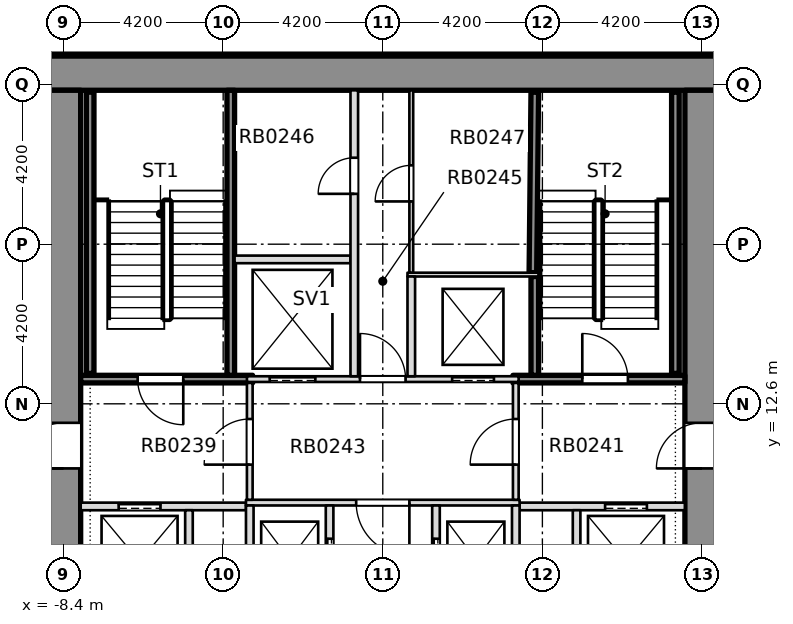
"""IFC4 building model, lengths in metres.
Left out: names, types, materials, properties, quantities, classifications, styles, units other than length and angle.
Written with IfcOpenShell. Run it as: python <this file> out.ifc"""

import sys

from ifc_helpers import new_model, si_unit, direction, frame, frame_2d, origin, place, context, subcontext, project, spatial, polyline, rectangle, outline, extrude, element, fill, save


model = new_model("IFC4")
c1 = context("Model", 3, precision=1e-05, world=origin(), true_north=direction((0.0, 1.0)))
c2 = subcontext(c1, "Body", "Model", "MODEL_VIEW")
j1 = project(units=[si_unit("LENGTHUNIT", "METRE"), si_unit("PLANEANGLEUNIT", "RADIAN")], contexts=[c1])
p1 = place(None, origin())
s1 = spatial("IfcSite", under=j1, at=p1, CompositionType="ELEMENT")
p2 = place(p1, origin())
s2 = spatial("IfcBuilding", under=s1, at=p2, CompositionType="ELEMENT")
p3 = place(p2, frame((0.0, 0.0, -8.4)))
s3 = spatial("IfcBuildingStorey", under=s2, at=p3, CompositionType="ELEMENT", Elevation=-8.4)
p4 = place(p3, frame((-11.7, 21.3, 0.0), z_axis=(0.0, 0.0, 1.0), x_axis=(1.0, 0.0, 0.0)))
e1 = element("IfcWall", 1, at=p4, inside=s3, PredefinedType="SOLIDWALL", context=c2, shape_type="SweptSolid", body=[
    extrude(rectangle(XDim=23.4, YDim=0.9, at=frame_2d((11.7, 0.0))), origin(), (0.0, 0.0, 1.0), 3.85),
])
p5 = place(p3, frame((-8.4, -7.5, 0.0), z_axis=(0.0, 0.0, 1.0), x_axis=(0.0, 1.0, 0.0)))
e2 = element("IfcWall", 2, at=p5, inside=s3, PredefinedType="SHEAR", context=c2, shape_type="SweptSolid", body=[
    extrude(rectangle(XDim=28.35, YDim=0.9, at=frame_2d((14.175, 0.0))), origin(), (0.0, 0.0, 1.0), 3.85),
])
p6 = place(p5, frame((18.4, 0.0, 0.0)))
e3 = element("IfcOpeningElement", 3, at=p6, cuts=e2, PredefinedType="OPENING", context=c2, shape_type="SweptSolid", body=[
    extrude(rectangle(XDim=1.2, YDim=2.1, at=frame_2d((0.6, 1.05))), frame((0.0, 0.46, 0.0), z_axis=(0.0, -1.0, 0.0), x_axis=(1.0, 0.0, 0.0)), (0.0, 0.0, 1.0), 0.92),
])
p7 = place(p3, frame((8.4, -7.5, 0.0), z_axis=(0.0, 0.0, 1.0), x_axis=(0.0, 1.0, 0.0)))
e4 = element("IfcWall", 4, at=p7, inside=s3, PredefinedType="SHEAR", context=c2, shape_type="SweptSolid", body=[
    extrude(rectangle(XDim=28.35, YDim=0.9, at=frame_2d((14.175, 0.0))), origin(), (0.0, 0.0, 1.0), 3.85),
])
p8 = place(p7, frame((18.4, 0.0, 0.0)))
e5 = element("IfcOpeningElement", 5, at=p8, cuts=e4, PredefinedType="OPENING", context=c2, shape_type="SweptSolid", body=[
    extrude(rectangle(XDim=1.2, YDim=2.1, at=frame_2d((0.6, 1.05))), frame((0.0, 0.46, 0.0), z_axis=(0.0, -1.0, 0.0), x_axis=(1.0, 0.0, 0.0)), (0.0, 0.0, 1.0), 0.92),
])
p9 = place(p3, frame((-17.6, 22.0, 0.0), z_axis=(0.0, 0.0, 1.0), x_axis=(1.0, 0.0, 0.0)))
e6 = element("IfcWall", 6, at=p9, inside=s3, PredefinedType="SOLIDWALL", context=c2, shape_type="SweptSolid", body=[
    extrude(outline(polyline([(0.0, 0.0), (35.2, 0.0), (35.2, 3.9), (34.6, 3.899), (32.2, 3.702), (3.0, -0.105), (0.0, -0.301), (0.0, 0.0)])), frame((0.0, 0.2, 0.0), z_axis=(0.0, -1.0, 0.0), x_axis=(1.0, 0.0, 0.0)), (0.0, 0.0, 1.0), 0.4),
])
p10 = place(p3, frame((-7.949, 9.9, 0.0), z_axis=(0.0, 0.0, 1.0), x_axis=(1.0, 0.0, 0.0)))
e7 = element("IfcWall", 7, at=p10, inside=s3, PredefinedType="PARTITIONING", context=c2, shape_type="SweptSolid", body=[
    extrude(rectangle(XDim=4.349, YDim=0.2, at=frame_2d((2.174, 0.0))), origin(), (0.0, 0.0, 1.0), 3.85),
])
p11 = place(p10, frame((0.999, 0.0, 0.0)))
e8 = element("IfcOpeningElement", 8, at=p11, cuts=e7, PredefinedType="OPENING", context=c2, shape_type="SweptSolid", body=[
    extrude(rectangle(XDim=1.1, YDim=2.1, at=frame_2d((0.55, 1.05))), frame((0.0, 0.11, 0.0), z_axis=(0.0, -1.0, 0.0), x_axis=(1.0, 0.0, 0.0)), (0.0, 0.0, 1.0), 0.22),
])
p12 = place(p3, frame((3.6, 9.9, 0.0), z_axis=(0.0, 0.0, 1.0), x_axis=(1.0, 0.0, 0.0)))
e9 = element("IfcWall", 9, at=p12, inside=s3, PredefinedType="PARTITIONING", context=c2, shape_type="SweptSolid", body=[
    extrude(rectangle(XDim=4.349, YDim=0.2, at=frame_2d((2.174, 0.0))), origin(), (0.0, 0.0, 1.0), 3.85),
])
p13 = place(p12, frame((2.25, 0.0, 0.0)))
e10 = element("IfcOpeningElement", 10, at=p13, cuts=e9, PredefinedType="OPENING", context=c2, shape_type="SweptSolid", body=[
    extrude(rectangle(XDim=1.1, YDim=2.1, at=frame_2d((0.55, 1.05))), frame((0.0, 0.11, 0.0), z_axis=(0.0, -1.0, 0.0), x_axis=(1.0, 0.0, 0.0)), (0.0, 0.0, 1.0), 0.22),
])
p14 = place(p3, frame((-3.6, 10.0, 0.0), z_axis=(0.0, 0.0, 1.0), x_axis=(1.0, 0.0, 0.0)))
e11 = element("IfcWall", 11, at=p14, inside=s3, PredefinedType="PARTITIONING", context=c2, shape_type="SweptSolid", body=[
    extrude(rectangle(XDim=7.2, YDim=0.15, at=frame_2d((3.6, 0.0))), origin(), (0.0, 0.0, 1.0), 3.85),
])
p15 = place(p14, frame((2.9, 0.0, 0.0)))
e12 = element("IfcOpeningElement", 12, at=p15, cuts=e11, PredefinedType="OPENING", context=c2, shape_type="SweptSolid", body=[
    extrude(rectangle(XDim=1.4, YDim=2.1, at=frame_2d((0.7, 1.05))), frame((0.0, 0.085, 0.0), z_axis=(0.0, -1.0, 0.0), x_axis=(1.0, 0.0, 0.0)), (0.0, 0.0, 1.0), 0.17),
])
p16 = place(p3, frame((-7.949, 13.25, 0.0), z_axis=(0.0, 0.0, 1.0), x_axis=(1.0, 0.0, 0.0)))
e13 = element("IfcWall", 13, at=p16, inside=s3, PredefinedType="SOLIDWALL", context=c2, shape_type="SweptSolid", body=[
    extrude(rectangle(XDim=4.524, YDim=0.2, at=frame_2d((2.262, 0.0))), origin(), (0.0, 0.0, 1.0), 3.85),
])
p17 = place(p16, frame((1.499, 0.0, 0.0)))
e14 = element("IfcOpeningElement", 14, at=p17, cuts=e13, PredefinedType="OPENING", context=c2, shape_type="SweptSolid", body=[
    extrude(rectangle(XDim=1.2, YDim=2.1, at=frame_2d((0.6, 1.05))), frame((0.0, 0.11, 0.0), z_axis=(0.0, -1.0, 0.0), x_axis=(1.0, 0.0, 0.0)), (0.0, 0.0, 1.0), 0.22),
])
p18 = place(p3, frame((-3.575, 13.25, 0.0), z_axis=(0.0, 0.0, 1.0), x_axis=(1.0, 0.0, 0.0)))
e15 = element("IfcWall", 15, at=p18, inside=s3, PredefinedType="PARTITIONING", context=c2, shape_type="SweptSolid", body=[
    extrude(rectangle(XDim=7.15, YDim=0.15, at=frame_2d((3.575, 0.0))), origin(), (0.0, 0.0, 1.0), 3.85),
])
p19 = place(p18, frame((0.6, 0.0, 0.0)))
e16 = element("IfcOpeningElement", 16, at=p19, cuts=e15, PredefinedType="OPENING", context=c2, shape_type="SweptSolid", body=[
    extrude(rectangle(XDim=1.2, YDim=2.1, at=frame_2d((0.6, 1.05))), frame((0.0, 0.085, 0.0), z_axis=(0.0, -1.0, 0.0), x_axis=(1.0, 0.0, 0.0)), (0.0, 0.0, 1.0), 0.17),
])
p20 = place(p18, frame((5.4, 0.0, 0.0)))
e17 = element("IfcOpeningElement", 17, at=p20, cuts=e15, PredefinedType="OPENING", context=c2, shape_type="SweptSolid", body=[
    extrude(rectangle(XDim=1.1, YDim=2.1, at=frame_2d((0.55, 1.05))), frame((0.0, 0.085, 0.0), z_axis=(0.0, -1.0, 0.0), x_axis=(1.0, 0.0, 0.0)), (0.0, 0.0, 1.0), 0.17),
])
p21 = place(p18, frame((2.975, 0.0, 0.0)))
e18 = element("IfcOpeningElement", 18, at=p21, cuts=e15, PredefinedType="OPENING", context=c2, shape_type="SweptSolid", body=[
    extrude(rectangle(XDim=1.2, YDim=2.1, at=frame_2d((0.6, 1.05))), frame((0.0, 0.085, 0.0), z_axis=(0.0, -1.0, 0.0), x_axis=(1.0, 0.0, 0.0)), (0.0, 0.0, 1.0), 0.17),
])
p22 = place(p3, frame((3.425, 13.25, 0.0), z_axis=(0.0, 0.0, 1.0), x_axis=(1.0, 0.0, 0.0)))
e19 = element("IfcWall", 19, at=p22, inside=s3, PredefinedType="SOLIDWALL", context=c2, shape_type="SweptSolid", body=[
    extrude(rectangle(XDim=4.524, YDim=0.2, at=frame_2d((2.262, 0.0))), origin(), (0.0, 0.0, 1.0), 3.85),
])
p23 = place(p22, frame((1.825, 0.0, 0.0)))
e20 = element("IfcOpeningElement", 20, at=p23, cuts=e19, PredefinedType="OPENING", context=c2, shape_type="SweptSolid", body=[
    extrude(rectangle(XDim=1.2, YDim=2.1, at=frame_2d((0.6, 1.05))), frame((0.0, 0.11, 0.0), z_axis=(0.0, -1.0, 0.0), x_axis=(1.0, 0.0, 0.0)), (0.0, 0.0, 1.0), 0.22),
])
p24 = place(p3, frame((0.65, 16.0, 0.0), z_axis=(0.0, 0.0, 1.0), x_axis=(1.0, 0.0, 0.0)))
e21 = element("IfcWall", 21, at=p24, inside=s3, PredefinedType="PARTITIONING", context=c2, shape_type="SweptSolid", body=[
    extrude(rectangle(XDim=3.45, YDim=0.1, at=frame_2d((1.725, 0.0))), origin(), (0.0, 0.0, 1.0), 3.85),
])
p25 = place(p3, frame((-3.9, 16.4, 0.0), z_axis=(0.0, 0.0, 1.0), x_axis=(1.0, 0.0, 0.0)))
e22 = element("IfcWall", 22, at=p25, inside=s3, PredefinedType="PARTITIONING", context=c2, shape_type="SweptSolid", body=[
    extrude(rectangle(XDim=3.05, YDim=0.2, at=frame_2d((1.525, 0.0))), origin(), (0.0, 0.0, 1.0), 3.85),
])
p26 = place(p3, frame((-5.1, 7.075, 0.0), z_axis=(0.0, 0.0, 1.0), x_axis=(0.0, 1.0, 0.0)))
e23 = element("IfcWall", 23, at=p26, inside=s3, PredefinedType="PARTITIONING", context=c2, shape_type="SweptSolid", body=[
    extrude(rectangle(XDim=2.725, YDim=0.2, at=frame_2d((1.363, 0.0))), origin(), (0.0, 0.0, 1.0), 3.85),
])
p27 = place(p3, frame((-4.0, 13.35, 0.0), z_axis=(0.0, 0.0, 1.0), x_axis=(0.0, 1.0, 0.0)))
e24 = element("IfcWall", 24, at=p27, inside=s3, PredefinedType="SOLIDWALL", context=c2, shape_type="SweptSolid", body=[
    extrude(rectangle(XDim=7.499, YDim=0.2, at=frame_2d((3.75, 0.0))), origin(), (0.0, 0.0, 1.0), 3.85),
])
p28 = place(p3, frame((-3.5, 7.075, 0.0), z_axis=(0.0, 0.0, 1.0), x_axis=(0.0, 1.0, 0.0)))
e25 = element("IfcWall", 25, at=p28, inside=s3, PredefinedType="PARTITIONING", context=c2, shape_type="SweptSolid", body=[
    extrude(rectangle(XDim=2.85, YDim=0.2, at=frame_2d((1.425, 0.0))), origin(), (0.0, 0.0, 1.0), 3.85),
])
p29 = place(p3, frame((-3.5, 10.075, 0.0), z_axis=(0.0, 0.0, 1.0), x_axis=(0.0, 1.0, 0.0)))
e26 = element("IfcWall", 26, at=p29, inside=s3, PredefinedType="PARTITIONING", context=c2, shape_type="SweptSolid", body=[
    extrude(rectangle(XDim=3.075, YDim=0.15, at=frame_2d((1.538, 0.0))), origin(), (0.0, 0.0, 1.0), 3.85),
])
p30 = place(p29, frame((0.925, 0.0, 0.0)))
e27 = element("IfcOpeningElement", 27, at=p30, cuts=e26, PredefinedType="OPENING", context=c2, shape_type="SweptSolid", body=[
    extrude(rectangle(XDim=1.2, YDim=2.1, at=frame_2d((0.6, 1.05))), frame((0.0, 0.085, 0.0), z_axis=(0.0, -1.0, 0.0), x_axis=(1.0, 0.0, 0.0)), (0.0, 0.0, 1.0), 0.17),
])
p31 = place(p3, frame((-1.4, 7.075, 0.0), z_axis=(0.0, 0.0, 1.0), x_axis=(0.0, 1.0, 0.0)))
e28 = element("IfcWall", 28, at=p31, inside=s3, PredefinedType="PARTITIONING", context=c2, shape_type="SweptSolid", body=[
    extrude(rectangle(XDim=2.85, YDim=0.2, at=frame_2d((1.425, 0.0))), origin(), (0.0, 0.0, 1.0), 3.85),
])
p32 = place(p31, frame((0.875, 0.0, 0.0)))
e29 = element("IfcOpeningElement", 29, at=p32, cuts=e28, PredefinedType="OPENING", context=c2, shape_type="SweptSolid", body=[
    extrude(rectangle(XDim=1.1, YDim=2.1, at=frame_2d((0.55, 1.05))), frame((0.0, 0.11, 0.0), z_axis=(0.0, -1.0, 0.0), x_axis=(1.0, 0.0, 0.0)), (0.0, 0.0, 1.0), 0.22),
])
p33 = place(p3, frame((-0.75, 13.325, 0.0), z_axis=(0.0, 0.0, 1.0), x_axis=(0.0, 1.0, 0.0)))
e30 = element("IfcWall", 30, at=p33, inside=s3, PredefinedType="PARTITIONING", context=c2, shape_type="SweptSolid", body=[
    extrude(rectangle(XDim=7.524, YDim=0.2, at=frame_2d((3.762, 0.0))), origin(), (0.0, 0.0, 1.0), 3.85),
])
p34 = place(p33, frame((4.8, 0.0, 0.0)))
e31 = element("IfcOpeningElement", 31, at=p34, cuts=e30, PredefinedType="OPENING", context=c2, shape_type="SweptSolid", body=[
    extrude(rectangle(XDim=0.95, YDim=2.1, at=frame_2d((0.475, 1.05))), frame((0.0, 0.11, 0.0), z_axis=(0.0, -1.0, 0.0), x_axis=(1.0, 0.0, 0.0)), (0.0, 0.0, 1.0), 0.22),
])
p35 = place(p3, frame((0.75, 13.325, 0.0), z_axis=(0.0, 0.0, 1.0), x_axis=(0.0, 1.0, 0.0)))
e32 = element("IfcWall", 32, at=p35, inside=s3, PredefinedType="PARTITIONING", context=c2, shape_type="SweptSolid", body=[
    extrude(rectangle(XDim=2.625, YDim=0.2, at=frame_2d((1.312, 0.0))), origin(), (0.0, 0.0, 1.0), 3.85),
])
p36 = place(p3, frame((0.75, 16.05, 0.0), z_axis=(0.0, 0.0, 1.0), x_axis=(0.0, 1.0, 0.0)))
e33 = element("IfcWall", 33, at=p36, inside=s3, PredefinedType="PARTITIONING", context=c2, shape_type="SweptSolid", body=[
    extrude(rectangle(XDim=4.799, YDim=0.1, at=frame_2d((2.399, 0.0))), origin(), (0.0, 0.0, 1.0), 3.85),
])
p37 = place(p36, frame((1.875, 0.0, 0.0)))
e34 = element("IfcOpeningElement", 34, at=p37, cuts=e33, PredefinedType="OPENING", context=c2, shape_type="SweptSolid", body=[
    extrude(rectangle(XDim=0.95, YDim=2.1, at=frame_2d((0.475, 1.05))), frame((0.0, 0.06, 0.0), z_axis=(0.0, -1.0, 0.0), x_axis=(1.0, 0.0, 0.0)), (0.0, 0.0, 1.0), 0.12),
])
p38 = place(p3, frame((1.4, 7.075, 0.0), z_axis=(0.0, 0.0, 1.0), x_axis=(0.0, 1.0, 0.0)))
e35 = element("IfcWall", 35, at=p38, inside=s3, PredefinedType="PARTITIONING", context=c2, shape_type="SweptSolid", body=[
    extrude(rectangle(XDim=2.85, YDim=0.2, at=frame_2d((1.425, 0.0))), origin(), (0.0, 0.0, 1.0), 3.85),
])
p39 = place(p38, frame((0.875, 0.0, 0.0)))
e36 = element("IfcOpeningElement", 36, at=p39, cuts=e35, PredefinedType="OPENING", context=c2, shape_type="SweptSolid", body=[
    extrude(rectangle(XDim=1.1, YDim=2.1, at=frame_2d((0.55, 1.05))), frame((0.0, 0.11, 0.0), z_axis=(0.0, -1.0, 0.0), x_axis=(1.0, 0.0, 0.0)), (0.0, 0.0, 1.0), 0.22),
])
p40 = place(p3, frame((3.5, 7.075, 0.0), z_axis=(0.0, 0.0, 1.0), x_axis=(0.0, 1.0, 0.0)))
e37 = element("IfcWall", 37, at=p40, inside=s3, PredefinedType="PARTITIONING", context=c2, shape_type="SweptSolid", body=[
    extrude(rectangle(XDim=2.85, YDim=0.2, at=frame_2d((1.425, 0.0))), origin(), (0.0, 0.0, 1.0), 3.85),
])
p41 = place(p3, frame((3.5, 10.075, 0.0), z_axis=(0.0, 0.0, 1.0), x_axis=(0.0, 1.0, 0.0)))
e38 = element("IfcWall", 38, at=p41, inside=s3, PredefinedType="PARTITIONING", context=c2, shape_type="SweptSolid", body=[
    extrude(rectangle(XDim=3.075, YDim=0.15, at=frame_2d((1.538, 0.0))), origin(), (0.0, 0.0, 1.0), 3.85),
])
p42 = place(p41, frame((0.925, 0.0, 0.0)))
e39 = element("IfcOpeningElement", 39, at=p42, cuts=e38, PredefinedType="OPENING", context=c2, shape_type="SweptSolid", body=[
    extrude(rectangle(XDim=1.2, YDim=2.1, at=frame_2d((0.6, 1.05))), frame((0.0, 0.085, 0.0), z_axis=(0.0, -1.0, 0.0), x_axis=(1.0, 0.0, 0.0)), (0.0, 0.0, 1.0), 0.17),
])
p43 = place(p3, frame((4.0, 13.35, 0.0), z_axis=(0.0, 0.0, 1.0), x_axis=(0.0, 1.0, 0.0)))
e40 = element("IfcWall", 40, at=p43, inside=s3, PredefinedType="SOLIDWALL", context=c2, shape_type="SweptSolid", body=[
    extrude(rectangle(XDim=2.6, YDim=0.2, at=frame_2d((1.3, 0.0))), origin(), (0.0, 0.0, 1.0), 3.85),
])
p44 = place(p3, frame((3.95, 16.05, 0.0), z_axis=(0.0, 0.0, 1.0), x_axis=(0.010538176883, 0.999944471872, 0.0)))
e41 = element("IfcWall", 41, at=p44, inside=s3, PredefinedType="SOLIDWALL", context=c2, shape_type="SweptSolid", body=[
    extrude(rectangle(XDim=4.749, YDim=0.2, at=frame_2d((2.375, 0.0))), origin(), (0.0, 0.0, 1.0), 3.85),
])
p45 = place(p3, frame((5.1, 7.075, 0.0), z_axis=(0.0, 0.0, 1.0), x_axis=(0.0, 1.0, 0.0)))
e42 = element("IfcWall", 42, at=p45, inside=s3, PredefinedType="PARTITIONING", context=c2, shape_type="SweptSolid", body=[
    extrude(rectangle(XDim=2.725, YDim=0.2, at=frame_2d((1.363, 0.0))), origin(), (0.0, 0.0, 1.0), 3.85),
])
for number, where, z_axis, x_axis in (
    (43, (-7.7, 13.4, 0.0), (0.0, 0.0, 1.0), (0.0, 1.0, 0.0)),
    (44, (7.7, 13.4, 0.0), (0.0, 0.0, 1.0), (0.0, 1.0, 0.0)),
):
    element("IfcWall", number, at=place(p3, frame(where, z_axis=z_axis, x_axis=x_axis)), inside=s3, PredefinedType="SOLIDWALL", context=c2, shape_type="SweptSolid", body=[
        extrude(rectangle(XDim=7.4, YDim=0.2, at=frame_2d((3.7, 0.0))), origin(), (0.0, 0.0, 1.0), 3.85),
    ])
p46 = place(p17, origin())
e45 = element("IfcDoor", 45, at=p46, inside=s3, OperationType="SINGLE_SWING_LEFT", PredefinedType="DOOR", context=c2, shape_type="SweptSolid", body=[
    extrude(rectangle(XDim=1.2, YDim=2.1, at=frame_2d((0.6, 1.05))), frame((0.0, 0.025, 0.0), z_axis=(0.0, -1.0, 0.0), x_axis=(1.0, 0.0, 0.0)), (0.0, 0.0, 1.0), 0.05),
])
fill(e14, e45)
p47 = place(p11, origin())
e46 = element("IfcDoor", 46, at=p47, inside=s3, OperationType="SLIDING_TO_RIGHT", PredefinedType="DOOR", context=c2, shape_type="SweptSolid", body=[
    extrude(rectangle(XDim=1.1, YDim=2.1, at=frame_2d((0.55, 1.05))), frame((0.0, 0.025, 0.0), z_axis=(0.0, -1.0, 0.0), x_axis=(1.0, 0.0, 0.0)), (0.0, 0.0, 1.0), 0.05),
])
fill(e8, e46)
p48 = place(p23, origin())
e47 = element("IfcDoor", 47, at=p48, inside=s3, OperationType="SINGLE_SWING_RIGHT", PredefinedType="DOOR", context=c2, shape_type="SweptSolid", body=[
    extrude(rectangle(XDim=1.2, YDim=2.1, at=frame_2d((0.6, 1.05))), frame((0.0, 0.025, 0.0), z_axis=(0.0, -1.0, 0.0), x_axis=(1.0, 0.0, 0.0)), (0.0, 0.0, 1.0), 0.05),
])
fill(e20, e47)
p49 = place(p13, origin())
e48 = element("IfcDoor", 48, at=p49, inside=s3, OperationType="SLIDING_TO_LEFT", PredefinedType="DOOR", context=c2, shape_type="SweptSolid", body=[
    extrude(rectangle(XDim=1.1, YDim=2.1, at=frame_2d((0.55, 1.05))), frame((0.0, 0.025, 0.0), z_axis=(0.0, -1.0, 0.0), x_axis=(1.0, 0.0, 0.0)), (0.0, 0.0, 1.0), 0.05),
])
fill(e10, e48)
p50 = place(p15, origin())
e49 = element("IfcDoor", 49, at=p50, inside=s3, OperationType="SINGLE_SWING_RIGHT", PredefinedType="DOOR", context=c2, shape_type="SweptSolid", body=[
    extrude(rectangle(XDim=1.4, YDim=2.1, at=frame_2d((0.7, 1.05))), frame((0.0, 0.025, 0.0), z_axis=(0.0, -1.0, 0.0), x_axis=(1.0, 0.0, 0.0)), (0.0, 0.0, 1.0), 0.05),
])
fill(e12, e49)
p51 = place(p32, origin())
e50 = element("IfcDoor", 50, at=p51, inside=s3, OperationType="SLIDING_TO_RIGHT", PredefinedType="DOOR", context=c2, shape_type="SweptSolid", body=[
    extrude(rectangle(XDim=1.1, YDim=2.1, at=frame_2d((0.55, 1.05))), frame((0.0, 0.025, 0.0), z_axis=(0.0, -1.0, 0.0), x_axis=(1.0, 0.0, 0.0)), (0.0, 0.0, 1.0), 0.05),
])
fill(e29, e50)
p52 = place(p39, origin())
e51 = element("IfcDoor", 51, at=p52, inside=s3, OperationType="SLIDING_TO_RIGHT", PredefinedType="DOOR", context=c2, shape_type="SweptSolid", body=[
    extrude(rectangle(XDim=1.1, YDim=2.1, at=frame_2d((0.55, 1.05))), frame((0.0, 0.025, 0.0), z_axis=(0.0, -1.0, 0.0), x_axis=(1.0, 0.0, 0.0)), (0.0, 0.0, 1.0), 0.05),
])
fill(e36, e51)
p53 = place(p19, origin())
e52 = element("IfcDoor", 52, at=p53, inside=s3, OperationType="SLIDING_TO_RIGHT", PredefinedType="DOOR", context=c2, shape_type="SweptSolid", body=[
    extrude(rectangle(XDim=1.2, YDim=2.1, at=frame_2d((0.6, 1.05))), frame((0.0, 0.025, 0.0), z_axis=(0.0, -1.0, 0.0), x_axis=(1.0, 0.0, 0.0)), (0.0, 0.0, 1.0), 0.05),
])
fill(e16, e52)
p54 = place(p20, origin())
e53 = element("IfcDoor", 53, at=p54, inside=s3, OperationType="SLIDING_TO_LEFT", PredefinedType="DOOR", context=c2, shape_type="SweptSolid", body=[
    extrude(rectangle(XDim=1.1, YDim=2.1, at=frame_2d((0.55, 1.05))), frame((0.0, 0.025, 0.0), z_axis=(0.0, -1.0, 0.0), x_axis=(1.0, 0.0, 0.0)), (0.0, 0.0, 1.0), 0.05),
])
fill(e17, e53)
p55 = place(p21, origin())
e54 = element("IfcDoor", 54, at=p55, inside=s3, OperationType="SINGLE_SWING_RIGHT", PredefinedType="DOOR", context=c2, shape_type="SweptSolid", body=[
    extrude(rectangle(XDim=1.2, YDim=2.1, at=frame_2d((0.6, 1.05))), frame((0.0, 0.025, 0.0), z_axis=(0.0, -1.0, 0.0), x_axis=(1.0, 0.0, 0.0)), (0.0, 0.0, 1.0), 0.05),
])
fill(e18, e54)
p56 = place(p34, origin())
e55 = element("IfcDoor", 55, at=p56, inside=s3, OperationType="SINGLE_SWING_RIGHT", PredefinedType="DOOR", context=c2, shape_type="SweptSolid", body=[
    extrude(rectangle(XDim=0.95, YDim=2.1, at=frame_2d((0.475, 1.05))), frame((0.0, 0.025, 0.0), z_axis=(0.0, -1.0, 0.0), x_axis=(1.0, 0.0, 0.0)), (0.0, 0.0, 1.0), 0.05),
])
fill(e31, e55)
p57 = place(p37, origin())
e56 = element("IfcDoor", 56, at=p57, inside=s3, OperationType="SINGLE_SWING_LEFT", PredefinedType="DOOR", context=c2, shape_type="SweptSolid", body=[
    extrude(rectangle(XDim=0.95, YDim=2.1, at=frame_2d((0.475, 1.05))), frame((0.0, 0.025, 0.0), z_axis=(0.0, -1.0, 0.0), x_axis=(1.0, 0.0, 0.0)), (0.0, 0.0, 1.0), 0.05),
])
fill(e34, e56)
p58 = place(p30, origin())
e57 = element("IfcDoor", 57, at=p58, inside=s3, OperationType="SINGLE_SWING_RIGHT", PredefinedType="DOOR", context=c2, shape_type="SweptSolid", body=[
    extrude(rectangle(XDim=1.2, YDim=2.1, at=frame_2d((0.6, 1.05))), frame((0.0, 0.025, 0.0), z_axis=(0.0, -1.0, 0.0), x_axis=(1.0, 0.0, 0.0)), (0.0, 0.0, 1.0), 0.05),
])
fill(e27, e57)
p59 = place(p42, origin())
e58 = element("IfcDoor", 58, at=p59, inside=s3, OperationType="SINGLE_SWING_LEFT", PredefinedType="DOOR", context=c2, shape_type="SweptSolid", body=[
    extrude(rectangle(XDim=1.2, YDim=2.1, at=frame_2d((0.6, 1.05))), frame((0.0, 0.025, 0.0), z_axis=(0.0, -1.0, 0.0), x_axis=(1.0, 0.0, 0.0)), (0.0, 0.0, 1.0), 0.05),
])
fill(e39, e58)
p60 = place(p6, origin())
e59 = element("IfcDoor", 59, at=p60, inside=s3, OperationType="SINGLE_SWING_LEFT", PredefinedType="DOOR", context=c2, shape_type="SweptSolid", body=[
    extrude(rectangle(XDim=1.2, YDim=2.1, at=frame_2d((0.6, 1.05))), frame((0.0, 0.025, 0.0), z_axis=(0.0, -1.0, 0.0), x_axis=(1.0, 0.0, 0.0)), (0.0, 0.0, 1.0), 0.05),
])
fill(e3, e59)
p61 = place(p8, origin())
e60 = element("IfcDoor", 60, at=p61, inside=s3, OperationType="SINGLE_SWING_LEFT", PredefinedType="DOOR", context=c2, shape_type="SweptSolid", body=[
    extrude(rectangle(XDim=1.2, YDim=2.1, at=frame_2d((0.6, 1.05))), frame((0.0, 0.025, 0.0), z_axis=(0.0, -1.0, 0.0), x_axis=(1.0, 0.0, 0.0)), (0.0, 0.0, 1.0), 0.05),
])
fill(e5, e60)
save(model, sys.argv[1])
